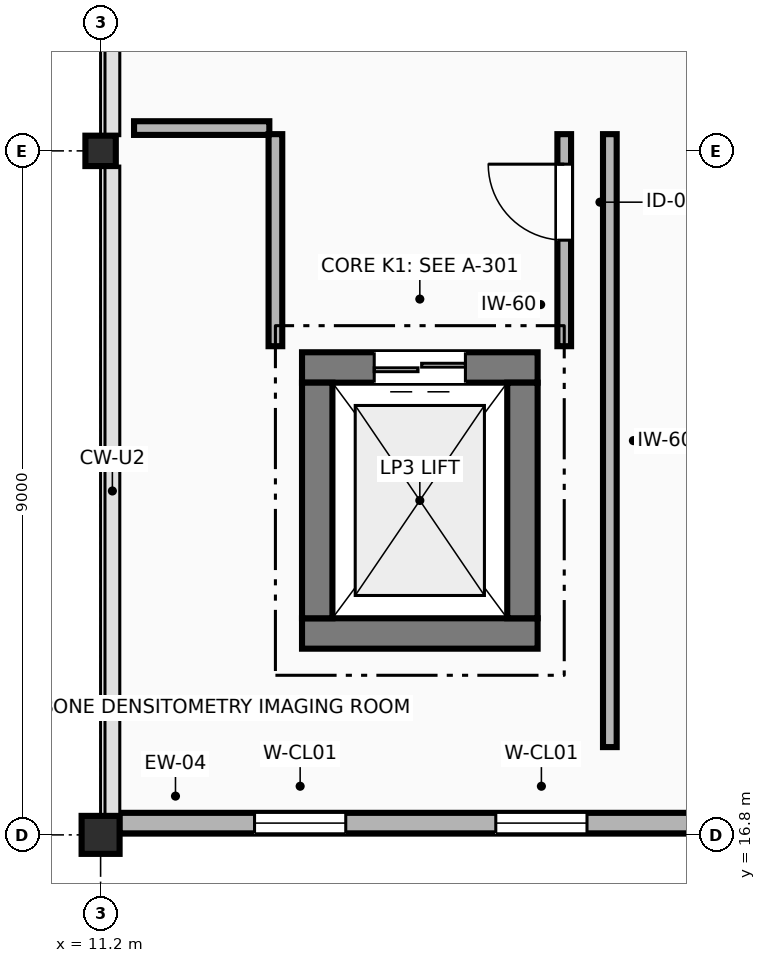
"""IFC4 building model, lengths in metres.
Left out: names, types, materials, properties, quantities, classifications, styles, units other than length and angle.
Written with IfcOpenShell. Run it as: python <this file> out.ifc"""

import sys

from ifc_helpers import new_model, si_unit, direction, frame, frame_2d, origin, origin_2d, place, context, subcontext, project, spatial, rectangle, extrude, element, fill, save


model = new_model("IFC4")
c1 = context("Model", 3, precision=1e-05, world=origin(), true_north=direction((0.0, 1.0)))
c2 = subcontext(c1, "Body", "Model", "MODEL_VIEW")
j1 = project(units=[si_unit("LENGTHUNIT", "METRE"), si_unit("PLANEANGLEUNIT", "RADIAN")], contexts=[c1])
p1 = place(None, origin())
s1 = spatial("IfcSite", under=j1, at=p1, CompositionType="ELEMENT")
p2 = place(p1, origin())
s2 = spatial("IfcBuilding", under=s1, at=p2, CompositionType="ELEMENT")
p3 = place(p2, frame((0.0, 0.0, 18.0)))
s3 = spatial("IfcBuildingStorey", under=s2, at=p3, CompositionType="ELEMENT", Elevation=18.0)
p4 = place(p3, frame((11.2, 16.8, 0.0), z_axis=(0.0, 0.0, 1.0), x_axis=(1.0, 0.0, 0.0)))
e1 = element("IfcColumn", 1, at=p4, inside=s3, PredefinedType="COLUMN", context=c2, shape_type="SweptSolid", body=[
    extrude(rectangle(XDim=0.5, YDim=0.5, at=origin_2d()), origin(), (0.0, 0.0, 1.0), 4.2),
])
p5 = place(p3, frame((11.2, 25.8, 0.0), z_axis=(0.0, 0.0, 1.0), x_axis=(1.0, 0.0, 0.0)))
e2 = element("IfcColumn", 2, at=p5, inside=s3, PredefinedType="COLUMN", context=c2, shape_type="SweptSolid", body=[
    extrude(rectangle(XDim=0.4, YDim=0.4, at=origin_2d()), origin(), (0.0, 0.0, 1.0), 4.2),
])
p6 = place(p3, frame((11.445, 16.955, 0.0), z_axis=(0.0, 0.0, 1.0), x_axis=(1.0, 0.0, 0.0)))
e3 = element("IfcWall", 3, at=p6, inside=s3, PredefinedType="STANDARD", context=c2, shape_type="SweptSolid", body=[
    extrude(rectangle(XDim=7.935, YDim=0.27, at=frame_2d((3.967, 0.0))), origin(), (0.0, 0.0, 1.0), 3.275),
])
p7 = place(p6, frame((1.781, 0.0, 0.95)))
e4 = element("IfcOpeningElement", 4, at=p7, cuts=e3, PredefinedType="OPENING", context=c2, shape_type="SweptSolid", body=[
    extrude(rectangle(XDim=1.2, YDim=1.5, at=frame_2d((0.6, 0.75))), frame((0.0, 0.145, 0.0), z_axis=(0.0, -1.0, 0.0), x_axis=(1.0, 0.0, 0.0)), (0.0, 0.0, 1.0), 0.29),
])
p8 = place(p6, frame((4.955, 0.0, 0.95)))
e5 = element("IfcOpeningElement", 5, at=p8, cuts=e3, PredefinedType="OPENING", context=c2, shape_type="SweptSolid", body=[
    extrude(rectangle(XDim=1.2, YDim=1.5, at=frame_2d((0.6, 0.75))), frame((0.0, 0.145, 0.0), z_axis=(0.0, -1.0, 0.0), x_axis=(1.0, 0.0, 0.0)), (0.0, 0.0, 1.0), 0.29),
])
p9 = place(p3, frame((13.85, 19.45, 0.0), z_axis=(0.0, 0.0, 1.0), x_axis=(1.0, 0.0, 0.0)))
e6 = element("IfcWall", 6, at=p9, inside=s3, PredefinedType="SHEAR", context=c2, shape_type="SweptSolid", body=[
    extrude(rectangle(XDim=3.1, YDim=0.4, at=frame_2d((1.55, 0.0))), origin(), (0.0, 0.0, 1.0), 4.2),
])
p10 = place(p3, frame((16.95, 22.95, 0.0), z_axis=(0.0, 0.0, 1.0), x_axis=(-1.0, 0.0, 0.0)))
e7 = element("IfcWall", 7, at=p10, inside=s3, PredefinedType="SHEAR", context=c2, shape_type="SweptSolid", body=[
    extrude(rectangle(XDim=3.1, YDim=0.4, at=frame_2d((1.55, 0.0))), origin(), (0.0, 0.0, 1.0), 4.2),
])
p11 = place(p10, frame((0.95, 0.0, 0.0)))
e8 = element("IfcOpeningElement", 8, at=p11, cuts=e7, PredefinedType="OPENING", context=c2, shape_type="SweptSolid", body=[
    extrude(rectangle(XDim=1.2, YDim=2.2, at=frame_2d((0.6, 1.1))), frame((0.0, 0.21, 0.0), z_axis=(0.0, -1.0, 0.0), x_axis=(1.0, 0.0, 0.0)), (0.0, 0.0, 1.0), 0.42),
])
for number, where, z_axis, x_axis in (
    (9, (14.05, 19.65, 0.0), (0.0, 0.0, 1.0), (0.0, 1.0, 0.0)),
    (10, (16.75, 22.75, 0.0), (0.0, 0.0, 1.0), (0.0, -1.0, 0.0)),
):
    element("IfcWall", number, at=place(p3, frame(where, z_axis=z_axis, x_axis=x_axis)), inside=s3, PredefinedType="SHEAR", context=c2, shape_type="SweptSolid", body=[
        extrude(rectangle(XDim=3.1, YDim=0.4, at=frame_2d((1.55, 0.0))), origin(), (0.0, 0.0, 1.0), 4.2),
    ])
p12 = place(p3, frame((17.3, 23.23, 0.0), z_axis=(0.0, 0.0, 1.0), x_axis=(0.0, 1.0, 0.0)))
e11 = element("IfcWall", 11, at=p12, inside=s3, PredefinedType="PARTITIONING", context=c2, shape_type="SweptSolid", body=[
    extrude(rectangle(XDim=2.79, YDim=0.18, at=frame_2d((1.395, 0.0))), origin(), (0.0, 0.0, 1.0), 3.94),
])
p13 = place(p12, frame((1.395, 0.0, 0.0)))
e12 = element("IfcOpeningElement", 12, at=p13, cuts=e11, PredefinedType="OPENING", context=c2, shape_type="SweptSolid", body=[
    extrude(rectangle(XDim=1.0, YDim=2.15, at=frame_2d((0.5, 1.075))), frame((0.0, 0.1, 0.0), z_axis=(0.0, -1.0, 0.0), x_axis=(1.0, 0.0, 0.0)), (0.0, 0.0, 1.0), 0.2),
])
p14 = place(p3, frame((17.9, 26.02, 0.0), z_axis=(0.0, 0.0, 1.0), x_axis=(0.0, -1.0, 0.0)))
e13 = element("IfcWall", 13, at=p14, inside=s3, PredefinedType="PARTITIONING", context=c2, shape_type="SweptSolid", body=[
    extrude(rectangle(XDim=8.065, YDim=0.18, at=frame_2d((4.032, 0.0))), origin(), (0.0, 0.0, 1.0), 3.94),
])
p15 = place(p3, frame((11.64, 26.1, 0.0), z_axis=(0.0, 0.0, 1.0), x_axis=(1.0, 0.0, 0.0)))
e14 = element("IfcWall", 14, at=p15, inside=s3, PredefinedType="PARTITIONING", context=c2, shape_type="SweptSolid", body=[
    extrude(rectangle(XDim=1.78, YDim=0.18, at=frame_2d((0.89, 0.0))), origin(), (0.0, 0.0, 1.0), 3.275),
])
p16 = place(p3, frame((13.5, 26.02, 0.0), z_axis=(0.0, 0.0, 1.0), x_axis=(0.0, -1.0, 0.0)))
e15 = element("IfcWall", 15, at=p16, inside=s3, PredefinedType="PARTITIONING", context=c2, shape_type="SweptSolid", body=[
    extrude(rectangle(XDim=2.79, YDim=0.18, at=frame_2d((1.395, 0.0))), origin(), (0.0, 0.0, 1.0), 3.94),
])
p17 = place(p7, origin())
e16 = element("IfcWindow", 16, at=p17, inside=s3, PartitioningType="SINGLE_PANEL", PredefinedType="WINDOW", context=c2, shape_type="SweptSolid", body=[
    extrude(rectangle(XDim=1.2, YDim=1.5, at=frame_2d((0.6, 0.75))), frame((0.0, 0.03, 0.0), z_axis=(0.0, -1.0, 0.0), x_axis=(1.0, 0.0, 0.0)), (0.0, 0.0, 1.0), 0.06),
])
fill(e4, e16)
p18 = place(p8, origin())
e17 = element("IfcWindow", 17, at=p18, inside=s3, PartitioningType="SINGLE_PANEL", PredefinedType="WINDOW", context=c2, shape_type="SweptSolid", body=[
    extrude(rectangle(XDim=1.2, YDim=1.5, at=frame_2d((0.6, 0.75))), frame((0.0, 0.03, 0.0), z_axis=(0.0, -1.0, 0.0), x_axis=(1.0, 0.0, 0.0)), (0.0, 0.0, 1.0), 0.06),
])
fill(e5, e17)
p19 = place(p11, origin())
e18 = element("IfcDoor", 18, at=p19, inside=s3, OperationType="DOUBLE_DOOR_SLIDING", PredefinedType="DOOR", context=c2, shape_type="SweptSolid", body=[
    extrude(rectangle(XDim=1.2, YDim=2.2, at=frame_2d((0.6, 1.1))), frame((0.0, 0.025, 0.0), z_axis=(0.0, -1.0, 0.0), x_axis=(1.0, 0.0, 0.0)), (0.0, 0.0, 1.0), 0.05),
])
fill(e8, e18)
p20 = place(p13, origin())
e19 = element("IfcDoor", 19, at=p20, inside=s3, OperationType="SINGLE_SWING_RIGHT", PredefinedType="DOOR", context=c2, shape_type="SweptSolid", body=[
    extrude(rectangle(XDim=1.0, YDim=2.15, at=frame_2d((0.5, 1.075))), frame((0.0, 0.025, 0.0), z_axis=(0.0, -1.0, 0.0), x_axis=(1.0, 0.0, 0.0)), (0.0, 0.0, 1.0), 0.05),
])
fill(e12, e19)
save(model, sys.argv[1])
